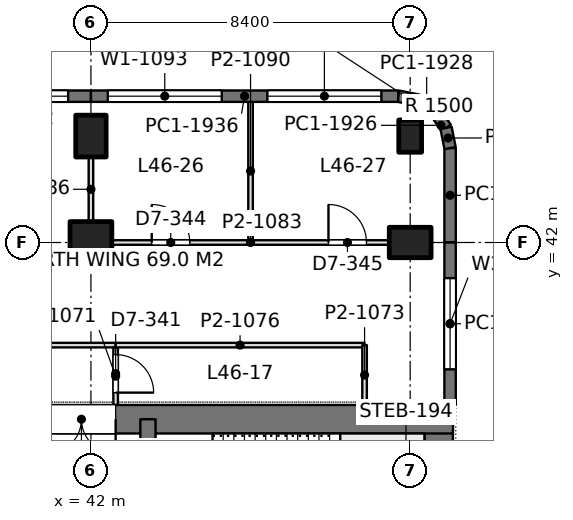
"""IFC4 building model, lengths in metres.
Left out: names, types, materials, properties, quantities, classifications, styles, units other than length and angle.
Written with IfcOpenShell. Run it as: python <this file> out.ifc"""

import sys

from ifc_helpers import new_model, si_unit, direction, frame, frame_2d, origin, origin_2d, place, context, subcontext, project, spatial, rectangle, extrude, element, fill, save


model = new_model("IFC4")
c1 = context("Model", 3, precision=1e-05, world=origin(), true_north=direction((0.0, 1.0)))
c2 = subcontext(c1, "Body", "Model", "MODEL_VIEW")
j1 = project(units=[si_unit("LENGTHUNIT", "METRE"), si_unit("PLANEANGLEUNIT", "RADIAN")], contexts=[c1])
p1 = place(None, origin())
s1 = spatial("IfcSite", under=j1, at=p1, CompositionType="ELEMENT")
p2 = place(p1, origin())
s2 = spatial("IfcBuilding", under=s1, at=p2, CompositionType="ELEMENT")
p3 = place(p2, frame((0.0, 0.0, 202.8)))
s3 = spatial("IfcBuildingStorey", under=s2, at=p3, CompositionType="ELEMENT", Elevation=202.8)
p4 = place(p3, frame((42.0, 42.0, 0.0), z_axis=(0.0, 0.0, 1.0), x_axis=(1.0, 0.0, 0.0)))
e1 = element("IfcColumn", 1, at=p4, inside=s3, PredefinedType="COLUMN", context=c2, shape_type="SweptSolid", body=[
    extrude(rectangle(XDim=1.1, YDim=1.1, at=origin_2d()), origin(), (0.0, 0.0, 1.0), 4.2),
])
for number, where, z_axis, x_axis in (
    (2, (42.0, 44.8, 0.0), (0.0, 0.0, 1.0), (1.0, 0.0, 0.0)),
    (3, (50.4, 42.0, 0.0), (0.0, 0.0, 1.0), (0.0, 1.0, 0.0)),
):
    element("IfcColumn", number, at=place(p3, frame(where, z_axis=z_axis, x_axis=x_axis)), inside=s3, PredefinedType="COLUMN", context=c2, shape_type="SweptSolid", body=[
        extrude(rectangle(XDim=0.8, YDim=1.1, at=origin_2d()), origin(), (0.0, 0.0, 1.0), 4.2),
    ])
p5 = place(p3, frame((50.4, 44.8, 0.0), z_axis=(0.0, 0.0, 1.0), x_axis=(1.0, 0.0, 0.0)))
e4 = element("IfcColumn", 4, at=p5, inside=s3, PredefinedType="COLUMN", context=c2, shape_type="SweptSolid", body=[
    extrude(rectangle(XDim=0.6, YDim=0.85, at=origin_2d()), origin(), (0.0, 0.0, 1.0), 4.2),
])
p6 = place(p3, frame((33.675, 37.35, 0.0), z_axis=(0.0, 0.0, 1.0), x_axis=(1.0, 0.0, 0.0)))
e5 = element("IfcWall", 5, at=p6, inside=s3, PredefinedType="SHEAR", context=c2, shape_type="SweptSolid", body=[
    extrude(rectangle(XDim=17.85, YDim=0.75, at=frame_2d((8.925, 0.0))), origin(), (0.0, 0.0, 1.0), 4.2),
])
p7 = place(p6, frame((7.175, 0.0, 0.0)))
e6 = element("IfcOpeningElement", 6, at=p7, cuts=e5, PredefinedType="OPENING", context=c2, shape_type="SweptSolid", body=[
    extrude(rectangle(XDim=1.8, YDim=2.4, at=frame_2d((0.9, 1.2))), frame((0.0, 0.385, 0.0), z_axis=(0.0, -1.0, 0.0), x_axis=(1.0, 0.0, 0.0)), (0.0, 0.0, 1.0), 0.77),
])
p8 = place(p3, frame((51.15, 13.05, 0.0), z_axis=(0.0, 0.0, 1.0), x_axis=(0.0, 1.0, 0.0)))
e7 = element("IfcWall", 7, at=p8, inside=s3, PredefinedType="SHEAR", context=c2, shape_type="SweptSolid", body=[
    extrude(rectangle(XDim=24.3, YDim=0.75, at=frame_2d((12.15, 0.0))), origin(), (0.0, 0.0, 1.0), 4.2),
])
p9 = place(p3, frame((43.5, 13.05, 0.0), z_axis=(0.0, 0.0, 1.0), x_axis=(0.0, 1.0, 0.0)))
e8 = element("IfcWall", 8, at=p9, inside=s3, PredefinedType="SHEAR", context=c2, shape_type="SweptSolid", body=[
    extrude(rectangle(XDim=24.3, YDim=0.4, at=frame_2d((12.15, 0.0))), origin(), (0.0, 0.0, 1.0), 4.2),
])
p10 = place(p9, frame((1.3, 0.0, 0.0)))
e9 = element("IfcOpeningElement", 9, at=p10, cuts=e8, PredefinedType="OPENING", context=c2, shape_type="SweptSolid", body=[
    extrude(rectangle(XDim=1.0, YDim=2.2, at=frame_2d((0.5, 1.1))), frame((0.0, 0.21, 0.0), z_axis=(0.0, -1.0, 0.0), x_axis=(1.0, 0.0, 0.0)), (0.0, 0.0, 1.0), 0.42),
])
p11 = place(p9, frame((22.0, 0.0, 0.0)))
e10 = element("IfcOpeningElement", 10, at=p11, cuts=e8, PredefinedType="OPENING", context=c2, shape_type="SweptSolid", body=[
    extrude(rectangle(XDim=1.0, YDim=2.2, at=frame_2d((0.5, 1.1))), frame((0.0, 0.21, 0.0), z_axis=(0.0, -1.0, 0.0), x_axis=(1.0, 0.0, 0.0)), (0.0, 0.0, 1.0), 0.42),
])
p12 = place(p9, frame((5.55, 0.0, 0.0)))
e11 = element("IfcOpeningElement", 11, at=p12, cuts=e8, PredefinedType="OPENING", context=c2, shape_type="SweptSolid", body=[
    extrude(rectangle(XDim=1.0, YDim=2.2, at=frame_2d((0.5, 1.1))), frame((0.0, 0.21, 0.0), z_axis=(0.0, -1.0, 0.0), x_axis=(1.0, 0.0, 0.0)), (0.0, 0.0, 1.0), 0.42),
])
p13 = place(p9, frame((9.55, 0.0, 0.0)))
e12 = element("IfcOpeningElement", 12, at=p13, cuts=e8, PredefinedType="OPENING", context=c2, shape_type="SweptSolid", body=[
    extrude(rectangle(XDim=1.0, YDim=2.2, at=frame_2d((0.5, 1.1))), frame((0.0, 0.21, 0.0), z_axis=(0.0, -1.0, 0.0), x_axis=(1.0, 0.0, 0.0)), (0.0, 0.0, 1.0), 0.42),
])
p14 = place(p9, frame((12.8, 0.0, 0.0)))
e13 = element("IfcOpeningElement", 13, at=p14, cuts=e8, PredefinedType="OPENING", context=c2, shape_type="SweptSolid", body=[
    extrude(rectangle(XDim=1.1, YDim=2.2, at=frame_2d((0.55, 1.1))), frame((0.0, 0.21, 0.0), z_axis=(0.0, -1.0, 0.0), x_axis=(1.0, 0.0, 0.0)), (0.0, 0.0, 1.0), 0.42),
])
p15 = place(p9, frame((15.538, 0.0, 0.0)))
e14 = element("IfcOpeningElement", 14, at=p15, cuts=e8, PredefinedType="OPENING", context=c2, shape_type="SweptSolid", body=[
    extrude(rectangle(XDim=1.1, YDim=2.2, at=frame_2d((0.55, 1.1))), frame((0.0, 0.21, 0.0), z_axis=(0.0, -1.0, 0.0), x_axis=(1.0, 0.0, 0.0)), (0.0, 0.0, 1.0), 0.42),
])
p16 = place(p9, frame((18.262, 0.0, 0.0)))
e15 = element("IfcOpeningElement", 15, at=p16, cuts=e8, PredefinedType="OPENING", context=c2, shape_type="SweptSolid", body=[
    extrude(rectangle(XDim=1.1, YDim=2.2, at=frame_2d((0.55, 1.1))), frame((0.0, 0.21, 0.0), z_axis=(0.0, -1.0, 0.0), x_axis=(1.0, 0.0, 0.0)), (0.0, 0.0, 1.0), 0.42),
])
p17 = place(p3, frame((33.6, 45.85, 0.0), z_axis=(0.0, 0.0, 1.0), x_axis=(1.0, 0.0, 0.0)))
e16 = element("IfcWall", 16, at=p17, inside=s3, PredefinedType="SOLIDWALL", context=c2, shape_type="SweptSolid", body=[
    extrude(rectangle(XDim=8.4, YDim=0.3, at=frame_2d((4.2, 0.0))), origin(), (0.0, 0.0, 1.0), 4.05),
])
p18 = place(p17, frame((0.6, 0.0, 0.9)))
e17 = element("IfcOpeningElement", 17, at=p18, cuts=e16, PredefinedType="OPENING", context=c2, shape_type="SweptSolid", body=[
    extrude(rectangle(XDim=3.0, YDim=1.9, at=frame_2d((1.5, 0.95))), frame((0.0, 0.16, 0.0), z_axis=(0.0, -1.0, 0.0), x_axis=(1.0, 0.0, 0.0)), (0.0, 0.0, 1.0), 0.32),
])
p19 = place(p17, frame((4.8, 0.0, 0.9)))
e18 = element("IfcOpeningElement", 18, at=p19, cuts=e16, PredefinedType="OPENING", context=c2, shape_type="SweptSolid", body=[
    extrude(rectangle(XDim=3.0, YDim=1.9, at=frame_2d((1.5, 0.95))), frame((0.0, 0.16, 0.0), z_axis=(0.0, -1.0, 0.0), x_axis=(1.0, 0.0, 0.0)), (0.0, 0.0, 1.0), 0.32),
])
p20 = place(p3, frame((42.0, 45.85, 0.0), z_axis=(0.0, 0.0, 1.0), x_axis=(1.0, 0.0, 0.0)))
e19 = element("IfcWall", 19, at=p20, inside=s3, PredefinedType="SOLIDWALL", context=c2, shape_type="SweptSolid", body=[
    extrude(rectangle(XDim=8.085, YDim=0.3, at=frame_2d((4.042, 0.0))), origin(), (0.0, 0.0, 1.0), 4.05),
])
p21 = place(p20, frame((0.443, 0.0, 0.9)))
e20 = element("IfcOpeningElement", 20, at=p21, cuts=e19, PredefinedType="OPENING", context=c2, shape_type="SweptSolid", body=[
    extrude(rectangle(XDim=3.0, YDim=1.9, at=frame_2d((1.5, 0.95))), frame((0.0, 0.16, 0.0), z_axis=(0.0, -1.0, 0.0), x_axis=(1.0, 0.0, 0.0)), (0.0, 0.0, 1.0), 0.32),
])
p22 = place(p20, frame((4.643, 0.0, 0.9)))
e21 = element("IfcOpeningElement", 21, at=p22, cuts=e19, PredefinedType="OPENING", context=c2, shape_type="SweptSolid", body=[
    extrude(rectangle(XDim=3.0, YDim=1.9, at=frame_2d((1.5, 0.95))), frame((0.0, 0.16, 0.0), z_axis=(0.0, -1.0, 0.0), x_axis=(1.0, 0.0, 0.0)), (0.0, 0.0, 1.0), 0.32),
])
p23 = place(p3, frame((50.085, 45.85, 0.0), z_axis=(0.0, 0.0, 1.0), x_axis=(0.980702050465, -0.1955082817, 0.0)))
e22 = element("IfcWall", 22, at=p23, inside=s3, PredefinedType="SOLIDWALL", context=c2, shape_type="SweptSolid", body=[
    extrude(rectangle(XDim=0.541, YDim=0.3, at=frame_2d((0.271, 0.0))), origin(), (0.0, 0.0, 1.0), 4.05),
])
p24 = place(p3, frame((50.615, 45.744, 0.0), z_axis=(0.0, 0.0, 1.0), x_axis=(0.831692711774, -0.555236195849, 0.0)))
e23 = element("IfcWall", 23, at=p24, inside=s3, PredefinedType="SOLIDWALL", context=c2, shape_type="SweptSolid", body=[
    extrude(rectangle(XDim=0.525, YDim=0.3, at=frame_2d((0.263, 0.0))), origin(), (0.0, 0.0, 1.0), 4.05),
])
p25 = place(p3, frame((51.052, 45.453, 0.0), z_axis=(0.0, 0.0, 1.0), x_axis=(0.55534295404, -0.831621430339, 0.0)))
e24 = element("IfcWall", 24, at=p25, inside=s3, PredefinedType="SOLIDWALL", context=c2, shape_type="SweptSolid", body=[
    extrude(rectangle(XDim=0.526, YDim=0.3, at=frame_2d((0.263, 0.0))), origin(), (0.0, 0.0, 1.0), 4.05),
])
p26 = place(p3, frame((51.344, 45.015, 0.0), z_axis=(0.0, 0.0, 1.0), x_axis=(0.195073962632, -0.980788534345, 0.0)))
e25 = element("IfcWall", 25, at=p26, inside=s3, PredefinedType="SOLIDWALL", context=c2, shape_type="SweptSolid", body=[
    extrude(rectangle(XDim=0.541, YDim=0.3, at=frame_2d((0.271, 0.0))), origin(), (0.0, 0.0, 1.0), 4.05),
])
p27 = place(p3, frame((51.45, 44.485, 0.0), z_axis=(0.0, 0.0, 1.0), x_axis=(0.0, -1.0, 0.0)))
e26 = element("IfcWall", 26, at=p27, inside=s3, PredefinedType="SOLIDWALL", context=c2, shape_type="SweptSolid", body=[
    extrude(rectangle(XDim=2.485, YDim=0.3, at=frame_2d((1.243, 0.0))), origin(), (0.0, 0.0, 1.0), 4.05),
])
p28 = place(p3, frame((51.45, 42.0, 0.0), z_axis=(0.0, 0.0, 1.0), x_axis=(0.0, -1.0, 0.0)))
e27 = element("IfcWall", 27, at=p28, inside=s3, PredefinedType="SOLIDWALL", context=c2, shape_type="SweptSolid", body=[
    extrude(rectangle(XDim=4.275, YDim=0.3, at=frame_2d((2.137, 0.0))), origin(), (0.0, 0.0, 1.0), 4.05),
])
p29 = place(p28, frame((0.938, 0.0, 0.9)))
e28 = element("IfcOpeningElement", 28, at=p29, cuts=e27, PredefinedType="OPENING", context=c2, shape_type="SweptSolid", body=[
    extrude(rectangle(XDim=2.4, YDim=1.9, at=frame_2d((1.2, 0.95))), frame((0.0, 0.16, 0.0), z_axis=(0.0, -1.0, 0.0), x_axis=(1.0, 0.0, 0.0)), (0.0, 0.0, 1.0), 0.32),
])
p30 = place(p3, frame((42.549, 42.0, 0.0), z_axis=(0.0, 0.0, 1.0), x_axis=(1.0, 0.0, 0.0)))
e29 = element("IfcWall", 29, at=p30, inside=s3, PredefinedType="PARTITIONING", context=c2, shape_type="SweptSolid", body=[
    extrude(rectangle(XDim=7.302, YDim=0.12, at=frame_2d((3.651, 0.0))), origin(), (0.0, 0.0, 1.0), 3.55),
])
p31 = place(p30, frame((1.051, 0.0, 0.0)))
e30 = element("IfcOpeningElement", 30, at=p31, cuts=e29, PredefinedType="OPENING", context=c2, shape_type="SweptSolid", body=[
    extrude(rectangle(XDim=1.0, YDim=2.4, at=frame_2d((0.5, 1.2))), frame((0.0, 0.07, 0.0), z_axis=(0.0, -1.0, 0.0), x_axis=(1.0, 0.0, 0.0)), (0.0, 0.0, 1.0), 0.14),
])
p32 = place(p30, frame((5.701, 0.0, 0.0)))
e31 = element("IfcOpeningElement", 31, at=p32, cuts=e29, PredefinedType="OPENING", context=c2, shape_type="SweptSolid", body=[
    extrude(rectangle(XDim=1.0, YDim=2.4, at=frame_2d((0.5, 1.2))), frame((0.0, 0.07, 0.0), z_axis=(0.0, -1.0, 0.0), x_axis=(1.0, 0.0, 0.0)), (0.0, 0.0, 1.0), 0.14),
])
p33 = place(p3, frame((42.0, 42.549, 0.0), z_axis=(0.0, 0.0, 1.0), x_axis=(0.0, 1.0, 0.0)))
e32 = element("IfcWall", 32, at=p33, inside=s3, PredefinedType="PARTITIONING", context=c2, shape_type="SweptSolid", body=[
    extrude(rectangle(XDim=1.702, YDim=0.12, at=frame_2d((0.851, 0.0))), origin(), (0.0, 0.0, 1.0), 3.69),
])
p34 = place(p3, frame((46.2, 42.058, 0.0), z_axis=(0.0, 0.0, 1.0), x_axis=(0.0, 1.0, 0.0)))
e33 = element("IfcWall", 33, at=p34, inside=s3, PredefinedType="PARTITIONING", context=c2, shape_type="SweptSolid", body=[
    extrude(rectangle(XDim=3.644, YDim=0.12, at=frame_2d((1.822, 0.0))), origin(), (0.0, 0.0, 1.0), 3.55),
])
p35 = place(p3, frame((7.748, 39.3, 0.0), z_axis=(0.0, 0.0, 1.0), x_axis=(1.0, 0.0, 0.0)))
e34 = element("IfcWall", 34, at=p35, inside=s3, PredefinedType="PARTITIONING", context=c2, shape_type="SweptSolid", body=[
    extrude(rectangle(XDim=34.904, YDim=0.12, at=frame_2d((17.452, 0.0))), origin(), (0.0, 0.0, 1.0), 3.55),
])
p36 = place(p35, frame((2.119, 0.0, 0.0)))
e35 = element("IfcOpeningElement", 35, at=p36, cuts=e34, PredefinedType="OPENING", context=c2, shape_type="SweptSolid", body=[
    extrude(rectangle(XDim=1.8, YDim=2.2, at=frame_2d((0.9, 1.1))), frame((0.0, 0.07, 0.0), z_axis=(0.0, -1.0, 0.0), x_axis=(1.0, 0.0, 0.0)), (0.0, 0.0, 1.0), 0.14),
])
p37 = place(p35, frame((5.135, 0.0, 0.0)))
e36 = element("IfcOpeningElement", 36, at=p37, cuts=e34, PredefinedType="OPENING", context=c2, shape_type="SweptSolid", body=[
    extrude(rectangle(XDim=1.8, YDim=2.2, at=frame_2d((0.9, 1.1))), frame((0.0, 0.07, 0.0), z_axis=(0.0, -1.0, 0.0), x_axis=(1.0, 0.0, 0.0)), (0.0, 0.0, 1.0), 0.14),
])
p38 = place(p35, frame((13.752, 0.0, 0.0)))
e37 = element("IfcOpeningElement", 37, at=p38, cuts=e34, PredefinedType="OPENING", context=c2, shape_type="SweptSolid", body=[
    extrude(rectangle(XDim=1.8, YDim=2.2, at=frame_2d((0.9, 1.1))), frame((0.0, 0.07, 0.0), z_axis=(0.0, -1.0, 0.0), x_axis=(1.0, 0.0, 0.0)), (0.0, 0.0, 1.0), 0.14),
])
p39 = place(p35, frame((19.352, 0.0, 0.0)))
e38 = element("IfcOpeningElement", 38, at=p39, cuts=e34, PredefinedType="OPENING", context=c2, shape_type="SweptSolid", body=[
    extrude(rectangle(XDim=1.8, YDim=2.2, at=frame_2d((0.9, 1.1))), frame((0.0, 0.07, 0.0), z_axis=(0.0, -1.0, 0.0), x_axis=(1.0, 0.0, 0.0)), (0.0, 0.0, 1.0), 0.14),
])
p40 = place(p35, frame((27.969, 0.0, 0.0)))
e39 = element("IfcOpeningElement", 39, at=p40, cuts=e34, PredefinedType="OPENING", context=c2, shape_type="SweptSolid", body=[
    extrude(rectangle(XDim=1.8, YDim=2.2, at=frame_2d((0.9, 1.1))), frame((0.0, 0.07, 0.0), z_axis=(0.0, -1.0, 0.0), x_axis=(1.0, 0.0, 0.0)), (0.0, 0.0, 1.0), 0.14),
])
p41 = place(p35, frame((30.985, 0.0, 0.0)))
e40 = element("IfcOpeningElement", 40, at=p41, cuts=e34, PredefinedType="OPENING", context=c2, shape_type="SweptSolid", body=[
    extrude(rectangle(XDim=1.8, YDim=2.2, at=frame_2d((0.9, 1.1))), frame((0.0, 0.07, 0.0), z_axis=(0.0, -1.0, 0.0), x_axis=(1.0, 0.0, 0.0)), (0.0, 0.0, 1.0), 0.14),
])
p42 = place(p3, frame((42.65, 37.724, 0.0), z_axis=(0.0, 0.0, 1.0), x_axis=(0.0, 1.0, 0.0)))
e41 = element("IfcWall", 41, at=p42, inside=s3, PredefinedType="PARTITIONING", context=c2, shape_type="SweptSolid", body=[
    extrude(rectangle(XDim=1.518, YDim=0.12, at=frame_2d((0.759, 0.0))), origin(), (0.0, 0.0, 1.0), 4.05),
])
p43 = place(p42, frame((0.326, 0.0, 0.0)))
e42 = element("IfcOpeningElement", 42, at=p43, cuts=e41, PredefinedType="OPENING", context=c2, shape_type="SweptSolid", body=[
    extrude(rectangle(XDim=1.0, YDim=2.4, at=frame_2d((0.5, 1.2))), frame((0.0, 0.07, 0.0), z_axis=(0.0, -1.0, 0.0), x_axis=(1.0, 0.0, 0.0)), (0.0, 0.0, 1.0), 0.14),
])
p44 = place(p3, frame((42.648, 39.3, 0.0), z_axis=(0.0, 0.0, 1.0), x_axis=(1.0, 0.0, 0.0)))
e43 = element("IfcWall", 43, at=p44, inside=s3, PredefinedType="PARTITIONING", context=c2, shape_type="SweptSolid", body=[
    extrude(rectangle(XDim=6.552, YDim=0.12, at=frame_2d((3.276, 0.0))), origin(), (0.0, 0.0, 1.0), 3.69),
])
p45 = place(p3, frame((49.2, 37.724, 0.0), z_axis=(0.0, 0.0, 1.0), x_axis=(0.0, 1.0, 0.0)))
e44 = element("IfcWall", 44, at=p45, inside=s3, PredefinedType="PARTITIONING", context=c2, shape_type="SweptSolid", body=[
    extrude(rectangle(XDim=1.576, YDim=0.12, at=frame_2d((0.788, 0.0))), origin(), (0.0, 0.0, 1.0), 4.05),
])
p46 = place(p19, origin())
e45 = element("IfcWindow", 45, at=p46, inside=s3, PartitioningType="SINGLE_PANEL", PredefinedType="WINDOW", context=c2, shape_type="SweptSolid", body=[
    extrude(rectangle(XDim=3.0, YDim=1.9, at=frame_2d((1.5, 0.95))), frame((0.0, 0.03, 0.0), z_axis=(0.0, -1.0, 0.0), x_axis=(1.0, 0.0, 0.0)), (0.0, 0.0, 1.0), 0.06),
])
fill(e18, e45)
p47 = place(p21, origin())
e46 = element("IfcWindow", 46, at=p47, inside=s3, PartitioningType="SINGLE_PANEL", PredefinedType="WINDOW", context=c2, shape_type="SweptSolid", body=[
    extrude(rectangle(XDim=3.0, YDim=1.9, at=frame_2d((1.5, 0.95))), frame((0.0, 0.03, 0.0), z_axis=(0.0, -1.0, 0.0), x_axis=(1.0, 0.0, 0.0)), (0.0, 0.0, 1.0), 0.06),
])
fill(e20, e46)
p48 = place(p22, origin())
e47 = element("IfcWindow", 47, at=p48, inside=s3, PartitioningType="SINGLE_PANEL", PredefinedType="WINDOW", context=c2, shape_type="SweptSolid", body=[
    extrude(rectangle(XDim=3.0, YDim=1.9, at=frame_2d((1.5, 0.95))), frame((0.0, 0.03, 0.0), z_axis=(0.0, -1.0, 0.0), x_axis=(1.0, 0.0, 0.0)), (0.0, 0.0, 1.0), 0.06),
])
fill(e21, e47)
p49 = place(p29, origin())
e48 = element("IfcWindow", 48, at=p49, inside=s3, PartitioningType="SINGLE_PANEL", PredefinedType="WINDOW", context=c2, shape_type="SweptSolid", body=[
    extrude(rectangle(XDim=2.4, YDim=1.9, at=frame_2d((1.2, 0.95))), frame((0.0, 0.03, 0.0), z_axis=(0.0, -1.0, 0.0), x_axis=(1.0, 0.0, 0.0)), (0.0, 0.0, 1.0), 0.06),
])
fill(e28, e48)
p50 = place(p7, frame((1.8, 0.0, 0.0), z_axis=(0.0, 0.0, 1.0), x_axis=(-1.0, 0.0, 0.0)))
e49 = element("IfcDoor", 49, at=p50, inside=s3, OperationType="DOUBLE_DOOR_SINGLE_SWING", PredefinedType="DOOR", context=c2, shape_type="SweptSolid", body=[
    extrude(rectangle(XDim=1.8, YDim=2.4, at=frame_2d((0.9, 1.2))), frame((0.0, 0.025, 0.0), z_axis=(0.0, -1.0, 0.0), x_axis=(1.0, 0.0, 0.0)), (0.0, 0.0, 1.0), 0.05),
])
fill(e6, e49)
p51 = place(p31, origin())
e50 = element("IfcDoor", 50, at=p51, inside=s3, OperationType="SINGLE_SWING_LEFT", PredefinedType="DOOR", context=c2, shape_type="SweptSolid", body=[
    extrude(rectangle(XDim=1.0, YDim=2.4, at=frame_2d((0.5, 1.2))), frame((0.0, 0.025, 0.0), z_axis=(0.0, -1.0, 0.0), x_axis=(1.0, 0.0, 0.0)), (0.0, 0.0, 1.0), 0.05),
])
fill(e30, e50)
p52 = place(p32, origin())
e51 = element("IfcDoor", 51, at=p52, inside=s3, OperationType="SINGLE_SWING_LEFT", PredefinedType="DOOR", context=c2, shape_type="SweptSolid", body=[
    extrude(rectangle(XDim=1.0, YDim=2.4, at=frame_2d((0.5, 1.2))), frame((0.0, 0.025, 0.0), z_axis=(0.0, -1.0, 0.0), x_axis=(1.0, 0.0, 0.0)), (0.0, 0.0, 1.0), 0.05),
])
fill(e31, e51)
p53 = place(p43, frame((1.0, 0.0, 0.0), z_axis=(0.0, 0.0, 1.0), x_axis=(-1.0, 0.0, 0.0)))
e52 = element("IfcDoor", 52, at=p53, inside=s3, OperationType="SINGLE_SWING_RIGHT", PredefinedType="DOOR", context=c2, shape_type="SweptSolid", body=[
    extrude(rectangle(XDim=1.0, YDim=2.4, at=frame_2d((0.5, 1.2))), frame((0.0, 0.025, 0.0), z_axis=(0.0, -1.0, 0.0), x_axis=(1.0, 0.0, 0.0)), (0.0, 0.0, 1.0), 0.05),
])
fill(e42, e52)
save(model, sys.argv[1])
